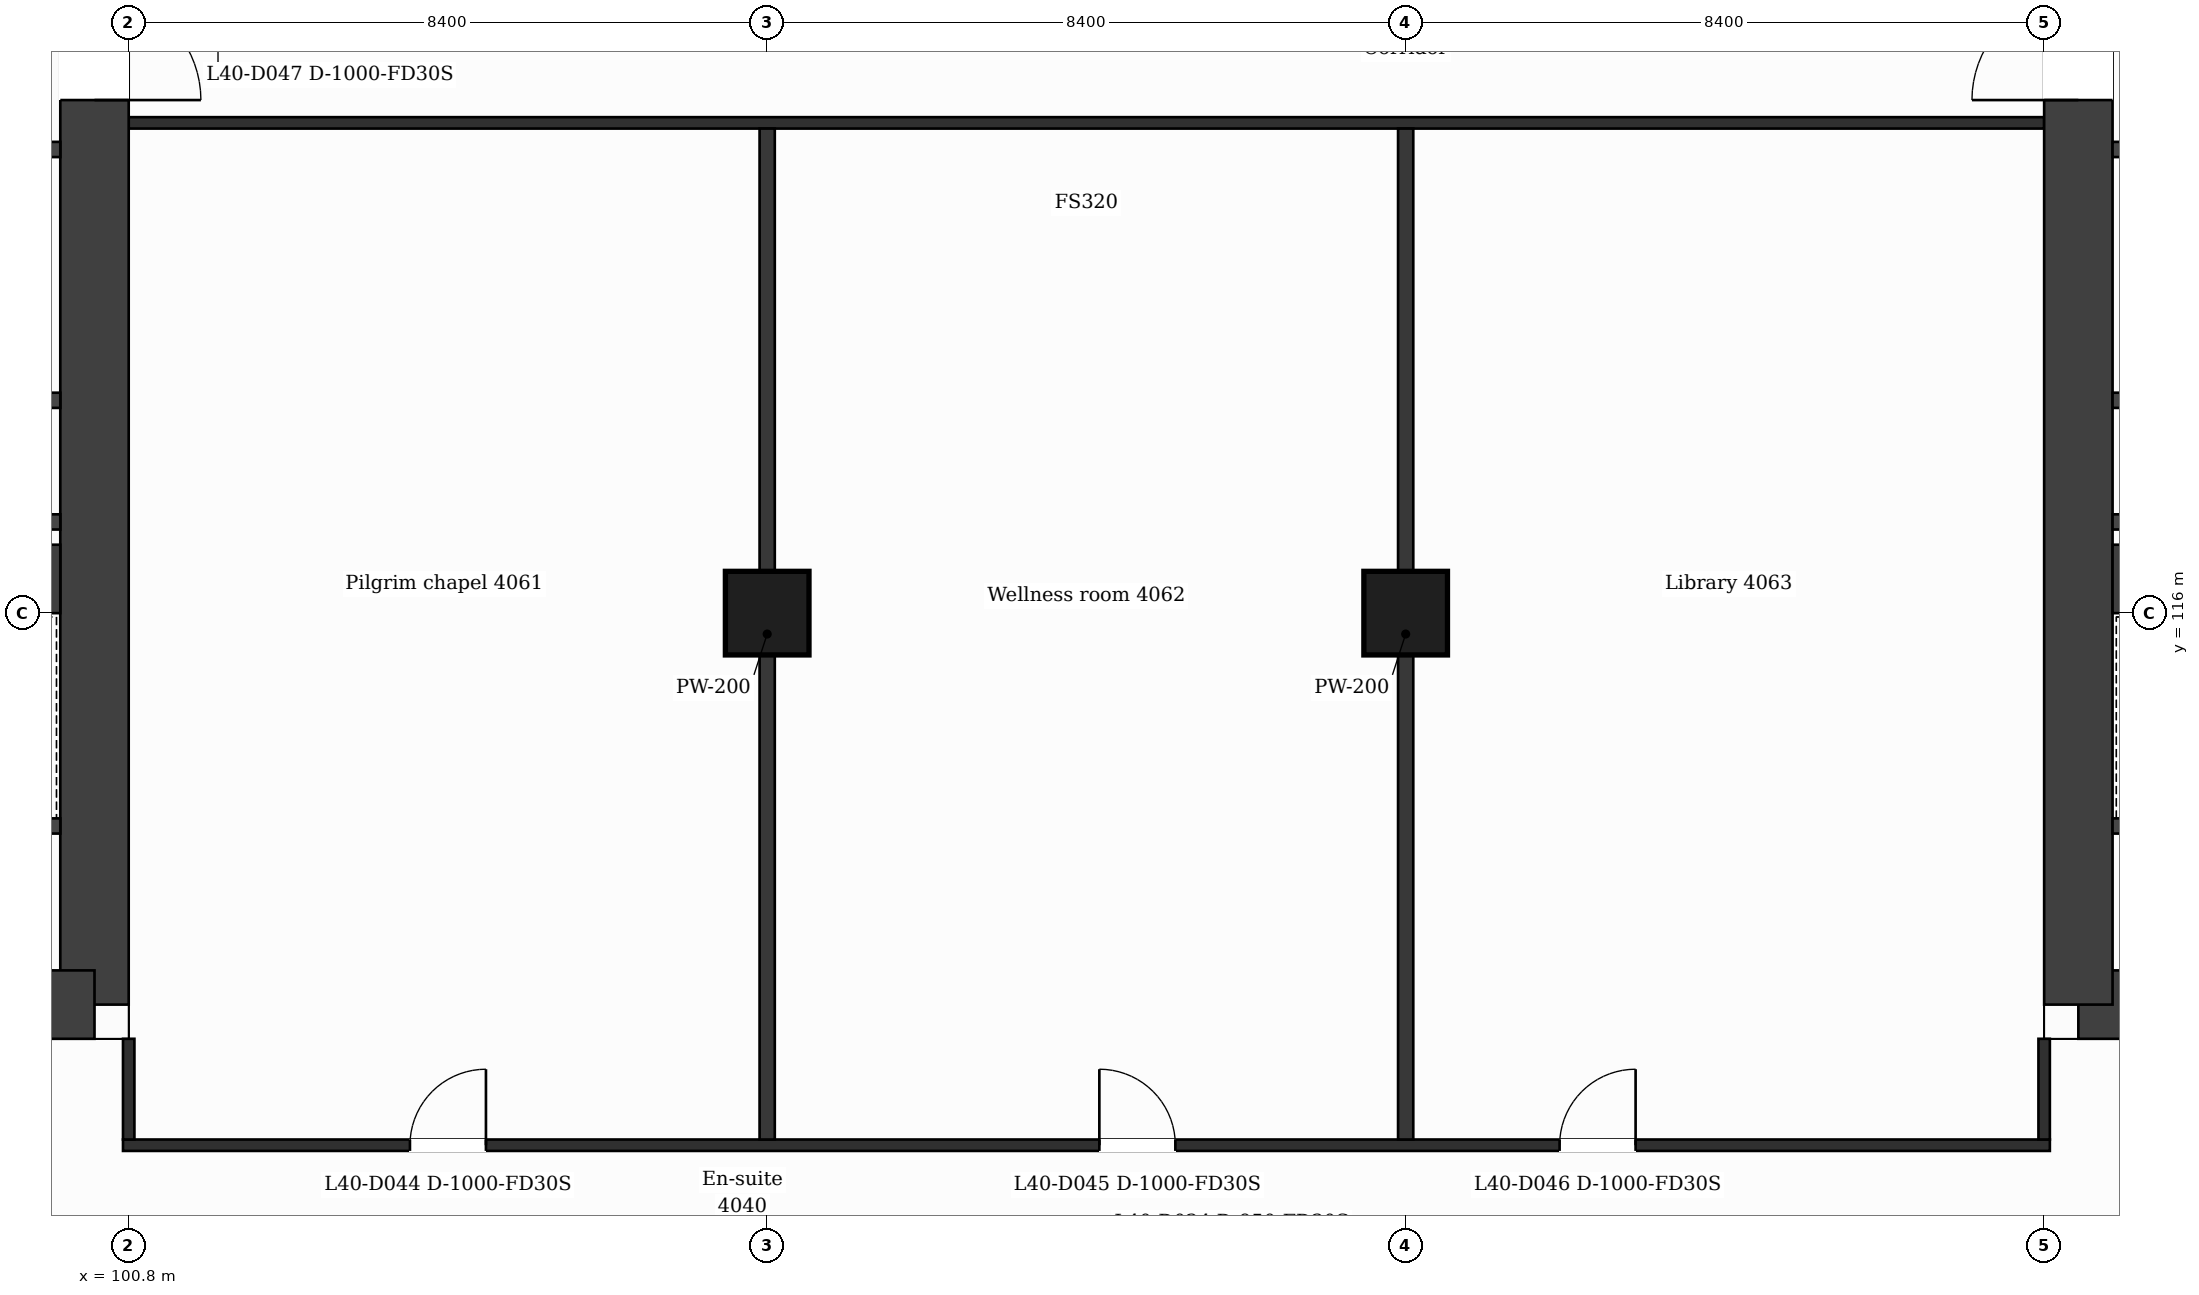
"""IFC4 building model, lengths in metres.
Left out: names, types, materials, properties, quantities, classifications, styles, units other than length and angle.
Written with IfcOpenShell. Run it as: python <this file> out.ifc"""

import sys

from ifc_helpers import new_model, si_unit, direction, frame, frame_2d, origin, origin_2d, place, context, subcontext, project, spatial, rectangle, extrude, element, fill, save


model = new_model("IFC4")
c1 = context("Model", 3, precision=1e-05, world=origin(), true_north=direction((0.0, 1.0)))
c2 = subcontext(c1, "Body", "Model", "MODEL_VIEW")
j1 = project(units=[si_unit("LENGTHUNIT", "METRE"), si_unit("PLANEANGLEUNIT", "RADIAN")], contexts=[c1])
p1 = place(None, origin())
s1 = spatial("IfcSite", under=j1, at=p1, CompositionType="ELEMENT")
p2 = place(p1, origin())
s2 = spatial("IfcBuilding", under=s1, at=p2, CompositionType="ELEMENT")
p3 = place(p2, frame((0.0, 0.0, 170.0)))
s3 = spatial("IfcBuildingStorey", under=s2, at=p3, CompositionType="ELEMENT", Elevation=170.0)
p4 = place(p3, frame((100.35, 131.95, 0.0), z_axis=(0.0, 0.0, 1.0), x_axis=(0.0, -1.0, 0.0)))
e1 = element("IfcWall", 1, at=p4, inside=s3, PredefinedType="SHEAR", context=c2, shape_type="SweptSolid", body=[
    extrude(rectangle(XDim=21.1, YDim=0.9, at=frame_2d((10.55, 0.0))), origin(), (0.0, 0.0, 1.0), 3.7),
])
p5 = place(p4, frame((7.8, 0.0, 0.0)))
e2 = element("IfcOpeningElement", 2, at=p5, cuts=e1, PredefinedType="OPENING", context=c2, shape_type="SweptSolid", body=[
    extrude(rectangle(XDim=1.4, YDim=2.1, at=frame_2d((0.7, 1.05))), frame((0.0, 0.46, 0.0), z_axis=(0.0, -1.0, 0.0), x_axis=(1.0, 0.0, 0.0)), (0.0, 0.0, 1.0), 0.92),
])
p6 = place(p3, frame((100.35, 110.85, 0.0), z_axis=(0.0, 0.0, 1.0), x_axis=(-1.0, 0.0, 0.0)))
e3 = element("IfcWall", 3, at=p6, inside=s3, PredefinedType="SHEAR", context=c2, shape_type="SweptSolid", body=[
    extrude(rectangle(XDim=14.166, YDim=0.9, at=frame_2d((7.083, 0.0))), origin(), (0.0, 0.0, 1.0), 3.7),
])
p7 = place(p6, frame((5.855, 0.0, 0.0)))
e4 = element("IfcOpeningElement", 4, at=p7, cuts=e3, PredefinedType="OPENING", context=c2, shape_type="SweptSolid", body=[
    extrude(rectangle(XDim=1.4, YDim=2.1, at=frame_2d((0.7, 1.05))), frame((0.0, 0.46, 0.0), z_axis=(0.0, -1.0, 0.0), x_axis=(1.0, 0.0, 0.0)), (0.0, 0.0, 1.0), 0.92),
])
p8 = place(p3, frame((94.8, 116.45, 0.0), z_axis=(0.0, 0.0, 1.0), x_axis=(1.0, 0.0, 0.0)))
e5 = element("IfcWall", 5, at=p8, inside=s3, PredefinedType="SHEAR", context=c2, shape_type="SweptSolid", body=[
    extrude(rectangle(XDim=5.1, YDim=0.9, at=frame_2d((2.55, 0.0))), origin(), (0.0, 0.0, 1.0), 3.7),
])
p9 = place(p3, frame((140.616, 110.85, 0.0), z_axis=(0.0, 0.0, 1.0), x_axis=(-1.0, 0.0, 0.0)))
e6 = element("IfcWall", 6, at=p9, inside=s3, PredefinedType="SHEAR", context=c2, shape_type="SweptSolid", body=[
    extrude(rectangle(XDim=14.166, YDim=0.9, at=frame_2d((7.083, 0.0))), origin(), (0.0, 0.0, 1.0), 3.7),
])
p10 = place(p9, frame((6.911, 0.0, 0.0)))
e7 = element("IfcOpeningElement", 7, at=p10, cuts=e6, PredefinedType="OPENING", context=c2, shape_type="SweptSolid", body=[
    extrude(rectangle(XDim=1.4, YDim=2.1, at=frame_2d((0.7, 1.05))), frame((0.0, 0.46, 0.0), z_axis=(0.0, -1.0, 0.0), x_axis=(1.0, 0.0, 0.0)), (0.0, 0.0, 1.0), 0.92),
])
p11 = place(p3, frame((126.45, 110.85, 0.0), z_axis=(0.0, 0.0, 1.0), x_axis=(0.0, 1.0, 0.0)))
e8 = element("IfcWall", 8, at=p11, inside=s3, PredefinedType="SHEAR", context=c2, shape_type="SweptSolid", body=[
    extrude(rectangle(XDim=21.1, YDim=0.9, at=frame_2d((10.55, 0.0))), origin(), (0.0, 0.0, 1.0), 3.7),
])
p12 = place(p11, frame((11.9, 0.0, 0.0)))
e9 = element("IfcOpeningElement", 9, at=p12, cuts=e8, PredefinedType="OPENING", context=c2, shape_type="SweptSolid", body=[
    extrude(rectangle(XDim=1.4, YDim=2.1, at=frame_2d((0.7, 1.05))), frame((0.0, 0.46, 0.0), z_axis=(0.0, -1.0, 0.0), x_axis=(1.0, 0.0, 0.0)), (0.0, 0.0, 1.0), 0.92),
])
p13 = place(p3, frame((126.9, 116.45, 0.0), z_axis=(0.0, 0.0, 1.0), x_axis=(1.0, 0.0, 0.0)))
e10 = element("IfcWall", 10, at=p13, inside=s3, PredefinedType="SHEAR", context=c2, shape_type="SweptSolid", body=[
    extrude(rectangle(XDim=5.1, YDim=0.9, at=frame_2d((2.55, 0.0))), origin(), (0.0, 0.0, 1.0), 3.7),
])
for number, where, z_axis, x_axis in (
    (11, (109.2, 116.0, 0.0), (0.0, 0.0, 1.0), (1.0, 0.0, 0.0)),
    (12, (117.6, 116.0, 0.0), (0.0, 0.0, 1.0), (1.0, 0.0, 0.0)),
):
    element("IfcColumn", number, at=place(p3, frame(where, z_axis=z_axis, x_axis=x_axis)), inside=s3, PredefinedType="COLUMN", context=c2, shape_type="SweptSolid", body=[
        extrude(rectangle(XDim=1.1, YDim=1.1, at=origin_2d()), origin(), (0.0, 0.0, 1.0), 3.7),
    ])
p14 = place(p3, frame((100.725, 109.0, 0.0), z_axis=(0.0, 0.0, 1.0), x_axis=(1.0, 0.0, 0.0)))
e13 = element("IfcWall", 13, at=p14, inside=s3, PredefinedType="PARTITIONING", context=c2, shape_type="SweptSolid", body=[
    extrude(rectangle(XDim=25.35, YDim=0.15, at=frame_2d((12.675, 0.0))), origin(), (0.0, 0.0, 1.0), 3.38),
])
p15 = place(p14, frame((3.775, 0.0, 0.0)))
e14 = element("IfcOpeningElement", 14, at=p15, cuts=e13, PredefinedType="OPENING", context=c2, shape_type="SweptSolid", body=[
    extrude(rectangle(XDim=1.0, YDim=2.1, at=frame_2d((0.5, 1.05))), frame((0.0, 0.085, 0.0), z_axis=(0.0, -1.0, 0.0), x_axis=(1.0, 0.0, 0.0)), (0.0, 0.0, 1.0), 0.17),
])
p16 = place(p14, frame((12.845, 0.0, 0.0)))
e15 = element("IfcOpeningElement", 15, at=p16, cuts=e13, PredefinedType="OPENING", context=c2, shape_type="SweptSolid", body=[
    extrude(rectangle(XDim=1.0, YDim=2.1, at=frame_2d((0.5, 1.05))), frame((0.0, 0.085, 0.0), z_axis=(0.0, -1.0, 0.0), x_axis=(1.0, 0.0, 0.0)), (0.0, 0.0, 1.0), 0.17),
])
p17 = place(p14, frame((18.9, 0.0, 0.0)))
e16 = element("IfcOpeningElement", 16, at=p17, cuts=e13, PredefinedType="OPENING", context=c2, shape_type="SweptSolid", body=[
    extrude(rectangle(XDim=1.0, YDim=2.1, at=frame_2d((0.5, 1.05))), frame((0.0, 0.085, 0.0), z_axis=(0.0, -1.0, 0.0), x_axis=(1.0, 0.0, 0.0)), (0.0, 0.0, 1.0), 0.17),
])
p18 = place(p3, frame((95.127, 113.2, 0.0), z_axis=(0.0, 0.0, 1.0), x_axis=(1.0, 0.0, 0.0)))
e17 = element("IfcWall", 17, at=p18, inside=s3, PredefinedType="PARTITIONING", context=c2, shape_type="SweptSolid", body=[
    extrude(rectangle(XDim=4.773, YDim=0.2, at=frame_2d((2.386, 0.0))), origin(), (0.0, 0.0, 1.0), 3.38),
])
p19 = place(p18, frame((2.921, 0.0, 0.0)))
e18 = element("IfcOpeningElement", 18, at=p19, cuts=e17, PredefinedType="OPENING", context=c2, shape_type="SweptSolid", body=[
    extrude(rectangle(XDim=1.1, YDim=2.1, at=frame_2d((0.55, 1.05))), frame((0.0, 0.11, 0.0), z_axis=(0.0, -1.0, 0.0), x_axis=(1.0, 0.0, 0.0)), (0.0, 0.0, 1.0), 0.22),
])
p20 = place(p3, frame((126.9, 113.2, 0.0), z_axis=(0.0, 0.0, 1.0), x_axis=(1.0, 0.0, 0.0)))
e19 = element("IfcWall", 19, at=p20, inside=s3, PredefinedType="PARTITIONING", context=c2, shape_type="SweptSolid", body=[
    extrude(rectangle(XDim=4.773, YDim=0.2, at=frame_2d((2.387, 0.0))), origin(), (0.0, 0.0, 1.0), 3.38),
])
p21 = place(p20, frame((0.618, 0.0, 0.0)))
e20 = element("IfcOpeningElement", 20, at=p21, cuts=e19, PredefinedType="OPENING", context=c2, shape_type="SweptSolid", body=[
    extrude(rectangle(XDim=1.1, YDim=2.1, at=frame_2d((0.55, 1.05))), frame((0.0, 0.11, 0.0), z_axis=(0.0, -1.0, 0.0), x_axis=(1.0, 0.0, 0.0)), (0.0, 0.0, 1.0), 0.22),
])
p22 = place(p3, frame((95.227, 117.2, 0.0), z_axis=(0.0, 0.0, 1.0), x_axis=(1.0, 0.0, 0.0)))
e21 = element("IfcWall", 21, at=p22, inside=s3, PredefinedType="PARTITIONING", context=c2, shape_type="SweptSolid", body=[
    extrude(rectangle(XDim=4.673, YDim=0.2, at=frame_2d((2.336, 0.0))), origin(), (0.0, 0.0, 1.0), 3.38),
])
p23 = place(p3, frame((126.9, 117.2, 0.0), z_axis=(0.0, 0.0, 1.0), x_axis=(1.0, 0.0, 0.0)))
e22 = element("IfcWall", 22, at=p23, inside=s3, PredefinedType="PARTITIONING", context=c2, shape_type="SweptSolid", body=[
    extrude(rectangle(XDim=4.673, YDim=0.2, at=frame_2d((2.336, 0.0))), origin(), (0.0, 0.0, 1.0), 3.38),
])
p24 = place(p3, frame((95.227, 118.8, 0.0), z_axis=(0.0, 0.0, 1.0), x_axis=(1.0, 0.0, 0.0)))
e23 = element("IfcWall", 23, at=p24, inside=s3, PredefinedType="PARTITIONING", context=c2, shape_type="SweptSolid", body=[
    extrude(rectangle(XDim=4.673, YDim=0.2, at=frame_2d((2.336, 0.0))), origin(), (0.0, 0.0, 1.0), 3.38),
])
p25 = place(p3, frame((126.9, 118.8, 0.0), z_axis=(0.0, 0.0, 1.0), x_axis=(1.0, 0.0, 0.0)))
e24 = element("IfcWall", 24, at=p25, inside=s3, PredefinedType="PARTITIONING", context=c2, shape_type="SweptSolid", body=[
    extrude(rectangle(XDim=4.673, YDim=0.2, at=frame_2d((2.336, 0.0))), origin(), (0.0, 0.0, 1.0), 3.38),
])
p26 = place(p3, frame((95.227, 122.1, 0.0), z_axis=(0.0, 0.0, 1.0), x_axis=(1.0, 0.0, 0.0)))
e25 = element("IfcWall", 25, at=p26, inside=s3, PredefinedType="PARTITIONING", context=c2, shape_type="SweptSolid", body=[
    extrude(rectangle(XDim=4.673, YDim=0.2, at=frame_2d((2.336, 0.0))), origin(), (0.0, 0.0, 1.0), 3.38),
])
p27 = place(p26, frame((2.655, 0.0, 0.0)))
e26 = element("IfcOpeningElement", 26, at=p27, cuts=e25, PredefinedType="OPENING", context=c2, shape_type="SweptSolid", body=[
    extrude(rectangle(XDim=0.9, YDim=2.1, at=frame_2d((0.45, 1.05))), frame((0.0, 0.11, 0.0), z_axis=(0.0, -1.0, 0.0), x_axis=(1.0, 0.0, 0.0)), (0.0, 0.0, 1.0), 0.22),
])
p28 = place(p3, frame((126.9, 122.1, 0.0), z_axis=(0.0, 0.0, 1.0), x_axis=(1.0, 0.0, 0.0)))
e27 = element("IfcWall", 27, at=p28, inside=s3, PredefinedType="PARTITIONING", context=c2, shape_type="SweptSolid", body=[
    extrude(rectangle(XDim=4.673, YDim=0.2, at=frame_2d((2.336, 0.0))), origin(), (0.0, 0.0, 1.0), 3.38),
])
p29 = place(p28, frame((2.655, 0.0, 0.0)))
e28 = element("IfcOpeningElement", 28, at=p29, cuts=e27, PredefinedType="OPENING", context=c2, shape_type="SweptSolid", body=[
    extrude(rectangle(XDim=0.9, YDim=2.1, at=frame_2d((0.45, 1.05))), frame((0.0, 0.11, 0.0), z_axis=(0.0, -1.0, 0.0), x_axis=(1.0, 0.0, 0.0)), (0.0, 0.0, 1.0), 0.22),
])
p30 = place(p3, frame((100.8, 122.45, 0.0), z_axis=(0.0, 0.0, 1.0), x_axis=(1.0, 0.0, 0.0)))
e29 = element("IfcWall", 29, at=p30, inside=s3, PredefinedType="PARTITIONING", context=c2, shape_type="SweptSolid", body=[
    extrude(rectangle(XDim=25.2, YDim=0.15, at=frame_2d((12.6, 0.0))), origin(), (0.0, 0.0, 1.0), 3.38),
])
p31 = place(p3, frame((100.8, 109.075, 0.0), z_axis=(0.0, 0.0, 1.0), x_axis=(0.0, 1.0, 0.0)))
e30 = element("IfcWall", 30, at=p31, inside=s3, PredefinedType="PARTITIONING", context=c2, shape_type="SweptSolid", body=[
    extrude(rectangle(XDim=1.325, YDim=0.15, at=frame_2d((0.663, 0.0))), origin(), (0.0, 0.0, 1.0), 3.38),
])
for number, where, z_axis, x_axis in (
    (31, (109.2, 109.075, 0.0), (0.0, 0.0, 1.0), (0.0, 1.0, 0.0)),
    (32, (117.6, 109.075, 0.0), (0.0, 0.0, 1.0), (0.0, 1.0, 0.0)),
):
    element("IfcWall", number, at=place(p3, frame(where, z_axis=z_axis, x_axis=x_axis)), inside=s3, PredefinedType="PARTITIONING", context=c2, shape_type="SweptSolid", body=[
        extrude(rectangle(XDim=13.3, YDim=0.2, at=frame_2d((6.65, 0.0))), origin(), (0.0, 0.0, 1.0), 3.38),
    ])
p32 = place(p3, frame((126.0, 109.075, 0.0), z_axis=(0.0, 0.0, 1.0), x_axis=(0.0, 1.0, 0.0)))
e33 = element("IfcWall", 33, at=p32, inside=s3, PredefinedType="PARTITIONING", context=c2, shape_type="SweptSolid", body=[
    extrude(rectangle(XDim=1.325, YDim=0.15, at=frame_2d((0.663, 0.0))), origin(), (0.0, 0.0, 1.0), 3.38),
])
p33 = place(p15, origin())
e34 = element("IfcDoor", 34, at=p33, inside=s3, OperationType="SINGLE_SWING_RIGHT", PredefinedType="DOOR", context=c2, shape_type="SweptSolid", body=[
    extrude(rectangle(XDim=1.0, YDim=2.1, at=frame_2d((0.5, 1.05))), frame((0.0, 0.025, 0.0), z_axis=(0.0, -1.0, 0.0), x_axis=(1.0, 0.0, 0.0)), (0.0, 0.0, 1.0), 0.05),
])
fill(e14, e34)
p34 = place(p16, origin())
e35 = element("IfcDoor", 35, at=p34, inside=s3, OperationType="SINGLE_SWING_LEFT", PredefinedType="DOOR", context=c2, shape_type="SweptSolid", body=[
    extrude(rectangle(XDim=1.0, YDim=2.1, at=frame_2d((0.5, 1.05))), frame((0.0, 0.025, 0.0), z_axis=(0.0, -1.0, 0.0), x_axis=(1.0, 0.0, 0.0)), (0.0, 0.0, 1.0), 0.05),
])
fill(e15, e35)
p35 = place(p17, origin())
e36 = element("IfcDoor", 36, at=p35, inside=s3, OperationType="SINGLE_SWING_RIGHT", PredefinedType="DOOR", context=c2, shape_type="SweptSolid", body=[
    extrude(rectangle(XDim=1.0, YDim=2.1, at=frame_2d((0.5, 1.05))), frame((0.0, 0.025, 0.0), z_axis=(0.0, -1.0, 0.0), x_axis=(1.0, 0.0, 0.0)), (0.0, 0.0, 1.0), 0.05),
])
fill(e16, e36)
p36 = place(p5, origin())
e37 = element("IfcDoor", 37, at=p36, inside=s3, OperationType="SINGLE_SWING_RIGHT", PredefinedType="DOOR", context=c2, shape_type="SweptSolid", body=[
    extrude(rectangle(XDim=1.4, YDim=2.1, at=frame_2d((0.7, 1.05))), frame((0.0, 0.025, 0.0), z_axis=(0.0, -1.0, 0.0), x_axis=(1.0, 0.0, 0.0)), (0.0, 0.0, 1.0), 0.05),
])
fill(e2, e37)
p37 = place(p12, origin())
e38 = element("IfcDoor", 38, at=p37, inside=s3, OperationType="SINGLE_SWING_LEFT", PredefinedType="DOOR", context=c2, shape_type="SweptSolid", body=[
    extrude(rectangle(XDim=1.4, YDim=2.1, at=frame_2d((0.7, 1.05))), frame((0.0, 0.025, 0.0), z_axis=(0.0, -1.0, 0.0), x_axis=(1.0, 0.0, 0.0)), (0.0, 0.0, 1.0), 0.05),
])
fill(e9, e38)
save(model, sys.argv[1])
